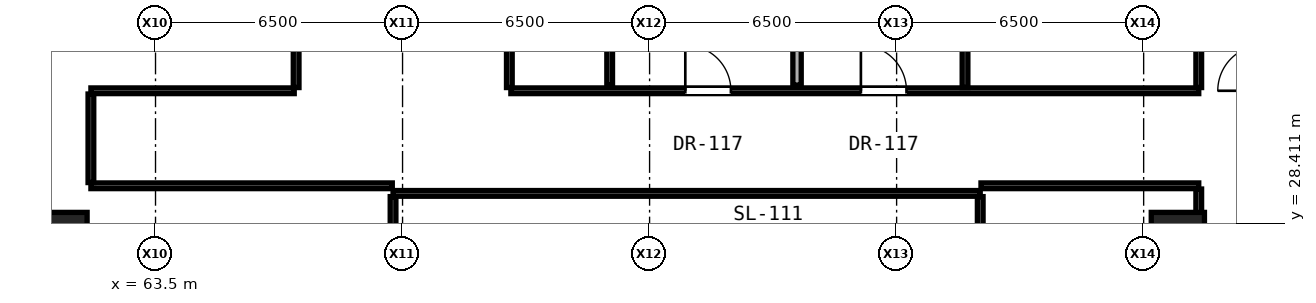
"""IFC4 building model, lengths in metres.
Left out: names, types, materials, properties, quantities, classifications, styles, units other than length and angle.
Written with IfcOpenShell. Run it as: python <this file> out.ifc"""

import sys

from ifc_helpers import new_model, si_unit, direction, frame, frame_2d, origin, origin_2d, place, context, subcontext, project, spatial, rectangle, hollow_rectangle, extrude, element, fill, save


model = new_model("IFC4")
c1 = context("Model", 3, precision=1e-05, world=origin(), true_north=direction((0.0, 1.0)))
c2 = subcontext(c1, "Body", "Model", "MODEL_VIEW")
j1 = project(units=[si_unit("LENGTHUNIT", "METRE"), si_unit("PLANEANGLEUNIT", "RADIAN")], contexts=[c1])
p1 = place(None, origin())
s1 = spatial("IfcSite", under=j1, at=p1, CompositionType="ELEMENT")
p2 = place(p1, origin())
s2 = spatial("IfcBuilding", under=s1, at=p2, CompositionType="ELEMENT")
p3 = place(p2, frame((0.0, 0.0, 5.2)))
s3 = spatial("IfcBuildingStorey", under=s2, at=p3, CompositionType="ELEMENT", Elevation=5.2)
for number, where, z_axis, x_axis in (
    (1, (61.0, 28.0, 0.0), (0.0, 0.0, 1.0), (1.0, 0.0, 0.0)),
    (2, (90.4, 28.0, 0.0), (0.0, 0.0, 1.0), (1.0, 0.0, 0.0)),
):
    element("IfcColumn", number, at=place(p3, frame(where, z_axis=z_axis, x_axis=x_axis)), inside=s3, PredefinedType="COLUMN", context=c2, shape_type="SweptSolid", body=[
        extrude(hollow_rectangle(XDim=1.4, YDim=1.4, WallThickness=0.08, at=origin_2d()), origin(), (0.0, 0.0, 1.0), 4.3),
    ])
p4 = place(p3, frame((69.75, 29.2, 0.0), z_axis=(0.0, 0.0, 1.0), x_axis=(1.0, 0.0, 0.0)))
e3 = element("IfcWall", 3, at=p4, inside=s3, PredefinedType="PARTITIONING", context=c2, shape_type="SweptSolid", body=[
    extrude(rectangle(XDim=15.45, YDim=0.15, at=frame_2d((7.725, 0.0))), origin(), (0.0, 0.0, 1.0), 3.045),
])
p5 = place(p3, frame((61.8, 29.4, 0.0), z_axis=(0.0, 0.0, 1.0), x_axis=(1.0, 0.0, 0.0)))
e4 = element("IfcWall", 4, at=p5, inside=s3, PredefinedType="PARTITIONING", context=c2, shape_type="SweptSolid", body=[
    extrude(rectangle(XDim=7.93, YDim=0.15, at=frame_2d((3.965, 0.0))), origin(), (0.0, 0.0, 1.0), 3.045),
])
p6 = place(p3, frame((85.22, 29.4, 0.0), z_axis=(0.0, 0.0, 1.0), x_axis=(1.0, 0.0, 0.0)))
e5 = element("IfcWall", 5, at=p6, inside=s3, PredefinedType="PARTITIONING", context=c2, shape_type="SweptSolid", body=[
    extrude(rectangle(XDim=5.73, YDim=0.15, at=frame_2d((2.865, 0.0))), origin(), (0.0, 0.0, 1.0), 3.116),
])
p7 = place(p3, frame((61.8, 31.9, 0.0), z_axis=(0.0, 0.0, 1.0), x_axis=(1.0, 0.0, 0.0)))
e6 = element("IfcWall", 6, at=p7, inside=s3, PredefinedType="PARTITIONING", context=c2, shape_type="SweptSolid", body=[
    extrude(rectangle(XDim=5.35, YDim=0.15, at=frame_2d((2.675, 0.0))), origin(), (0.0, 0.0, 1.0), 3.98),
])
p8 = place(p3, frame((72.85, 31.9, 0.0), z_axis=(0.0, 0.0, 1.0), x_axis=(1.0, 0.0, 0.0)))
e7 = element("IfcWall", 7, at=p8, inside=s3, PredefinedType="PARTITIONING", context=c2, shape_type="SweptSolid", body=[
    extrude(rectangle(XDim=18.1, YDim=0.15, at=frame_2d((9.05, 0.0))), origin(), (0.0, 0.0, 1.0), 3.045),
])
p9 = place(p8, frame((9.21, 0.0, 0.0)))
e8 = element("IfcOpeningElement", 8, at=p9, cuts=e7, PredefinedType="OPENING", context=c2, shape_type="SweptSolid", body=[
    extrude(rectangle(XDim=1.2, YDim=2.25, at=frame_2d((0.6, 1.125))), frame((0.0, 0.085, 0.0), z_axis=(0.0, -1.0, 0.0), x_axis=(1.0, 0.0, 0.0)), (0.0, 0.0, 1.0), 0.17),
])
p10 = place(p8, frame((4.59, 0.0, 0.0)))
e9 = element("IfcOpeningElement", 9, at=p10, cuts=e7, PredefinedType="OPENING", context=c2, shape_type="SweptSolid", body=[
    extrude(rectangle(XDim=1.2, YDim=2.25, at=frame_2d((0.6, 1.125))), frame((0.0, 0.085, 0.0), z_axis=(0.0, -1.0, 0.0), x_axis=(1.0, 0.0, 0.0)), (0.0, 0.0, 1.0), 0.17),
])
p11 = place(p3, frame((61.8, 29.485, 0.0), z_axis=(0.0, 0.0, 1.0), x_axis=(0.0, 1.0, 0.0)))
e10 = element("IfcWall", 10, at=p11, inside=s3, PredefinedType="PARTITIONING", context=c2, shape_type="SweptSolid", body=[
    extrude(rectangle(XDim=2.33, YDim=0.15, at=frame_2d((1.165, 0.0))), origin(), (0.0, 0.0, 1.0), 3.98),
])
p12 = place(p3, frame((67.2, 31.985, 0.0), z_axis=(0.0, 0.0, 1.0), x_axis=(0.0, 1.0, 0.0)))
e11 = element("IfcWall", 11, at=p12, inside=s3, PredefinedType="PARTITIONING", context=c2, shape_type="SweptSolid", body=[
    extrude(rectangle(XDim=3.215, YDim=0.15, at=frame_2d((1.607, 0.0))), origin(), (0.0, 0.0, 1.0), 2.872),
])
p13 = place(p3, frame((69.75, 25.885, 0.0), z_axis=(0.0, 0.0, 1.0), x_axis=(0.0, 1.0, 0.0)))
e12 = element("IfcWall", 12, at=p13, inside=s3, PredefinedType="PARTITIONING", context=c2, shape_type="SweptSolid", body=[
    extrude(rectangle(XDim=3.23, YDim=0.15, at=frame_2d((1.615, 0.0))), origin(), (0.0, 0.0, 1.0), 3.045),
])
p14 = place(p3, frame((72.81, 31.985, 0.0), z_axis=(0.0, 0.0, 1.0), x_axis=(0.0, 1.0, 0.0)))
e13 = element("IfcWall", 13, at=p14, inside=s3, PredefinedType="PARTITIONING", context=c2, shape_type="SweptSolid", body=[
    extrude(rectangle(XDim=2.845, YDim=0.15, at=frame_2d((1.422, 0.0))), origin(), (0.0, 0.0, 1.0), 3.98),
])
p15 = place(p14, frame((1.01, 0.0, 0.0)))
e14 = element("IfcOpeningElement", 14, at=p15, cuts=e13, PredefinedType="OPENING", context=c2, shape_type="SweptSolid", body=[
    extrude(rectangle(XDim=0.85, YDim=2.01, at=frame_2d((0.425, 1.005))), frame((0.0, 0.085, 0.0), z_axis=(0.0, -1.0, 0.0), x_axis=(1.0, 0.0, 0.0)), (0.0, 0.0, 1.0), 0.17),
])
p16 = place(p3, frame((75.45, 32.05, 0.0), z_axis=(0.0, 0.0, 1.0), x_axis=(0.0, 1.0, 0.0)))
e15 = element("IfcWall", 15, at=p16, inside=s3, PredefinedType="PARTITIONING", context=c2, shape_type="SweptSolid", body=[
    extrude(rectangle(XDim=2.78, YDim=0.15, at=frame_2d((1.39, 0.0))), origin(), (0.0, 0.0, 1.0), 3.98),
])
p17 = place(p3, frame((80.38, 32.05, 0.0), z_axis=(0.0, 0.0, 1.0), x_axis=(0.0, 1.0, 0.0)))
e16 = element("IfcWall", 16, at=p17, inside=s3, PredefinedType="SOLIDWALL", context=c2, shape_type="SweptSolid", body=[
    extrude(rectangle(XDim=2.78, YDim=0.22, at=frame_2d((1.39, 0.0))), origin(), (0.0, 0.0, 1.0), 3.98),
])
p18 = place(p3, frame((84.8, 31.985, 0.0), z_axis=(0.0, 0.0, 1.0), x_axis=(0.0, 1.0, 0.0)))
e17 = element("IfcWall", 17, at=p18, inside=s3, PredefinedType="PARTITIONING", context=c2, shape_type="SweptSolid", body=[
    extrude(rectangle(XDim=2.845, YDim=0.15, at=frame_2d((1.422, 0.0))), origin(), (0.0, 0.0, 1.0), 3.045),
])
p19 = place(p3, frame((85.2, 23.4, 0.0), z_axis=(0.0, 0.0, 1.0), x_axis=(0.0, 1.0, 0.0)))
e18 = element("IfcWall", 18, at=p19, inside=s3, PredefinedType="PARTITIONING", context=c2, shape_type="SweptSolid", body=[
    extrude(rectangle(XDim=5.715, YDim=0.15, at=frame_2d((2.857, 0.0))), origin(), (0.0, 0.0, 1.0), 3.045),
])
p20 = place(p3, frame((90.95, 23.285, 0.0), z_axis=(0.0, 0.0, 1.0), x_axis=(0.0, 1.0, 0.0)))
e19 = element("IfcWall", 19, at=p20, inside=s3, PredefinedType="PARTITIONING", context=c2, shape_type="SweptSolid", body=[
    extrude(rectangle(XDim=6.03, YDim=0.15, at=frame_2d((3.015, 0.0))), origin(), (0.0, 0.0, 1.0), 3.199),
])
p21 = place(p3, frame((90.95, 31.985, 0.0), z_axis=(0.0, 0.0, 1.0), x_axis=(0.0, 1.0, 0.0)))
e20 = element("IfcWall", 20, at=p21, inside=s3, PredefinedType="PARTITIONING", context=c2, shape_type="SweptSolid", body=[
    extrude(rectangle(XDim=9.13, YDim=0.15, at=frame_2d((4.565, 0.0))), origin(), (0.0, 0.0, 1.0), 3.116),
])
p22 = place(p9, origin())
e21 = element("IfcDoor", 21, at=p22, inside=s3, OperationType="SINGLE_SWING_LEFT", PredefinedType="DOOR", context=c2, shape_type="SweptSolid", body=[
    extrude(rectangle(XDim=1.2, YDim=2.25, at=frame_2d((0.6, 1.125))), frame((0.0, 0.025, 0.0), z_axis=(0.0, -1.0, 0.0), x_axis=(1.0, 0.0, 0.0)), (0.0, 0.0, 1.0), 0.05),
])
fill(e8, e21)
p23 = place(p10, origin())
e22 = element("IfcDoor", 22, at=p23, inside=s3, OperationType="SINGLE_SWING_LEFT", PredefinedType="DOOR", context=c2, shape_type="SweptSolid", body=[
    extrude(rectangle(XDim=1.2, YDim=2.25, at=frame_2d((0.6, 1.125))), frame((0.0, 0.025, 0.0), z_axis=(0.0, -1.0, 0.0), x_axis=(1.0, 0.0, 0.0)), (0.0, 0.0, 1.0), 0.05),
])
fill(e9, e22)
save(model, sys.argv[1])
